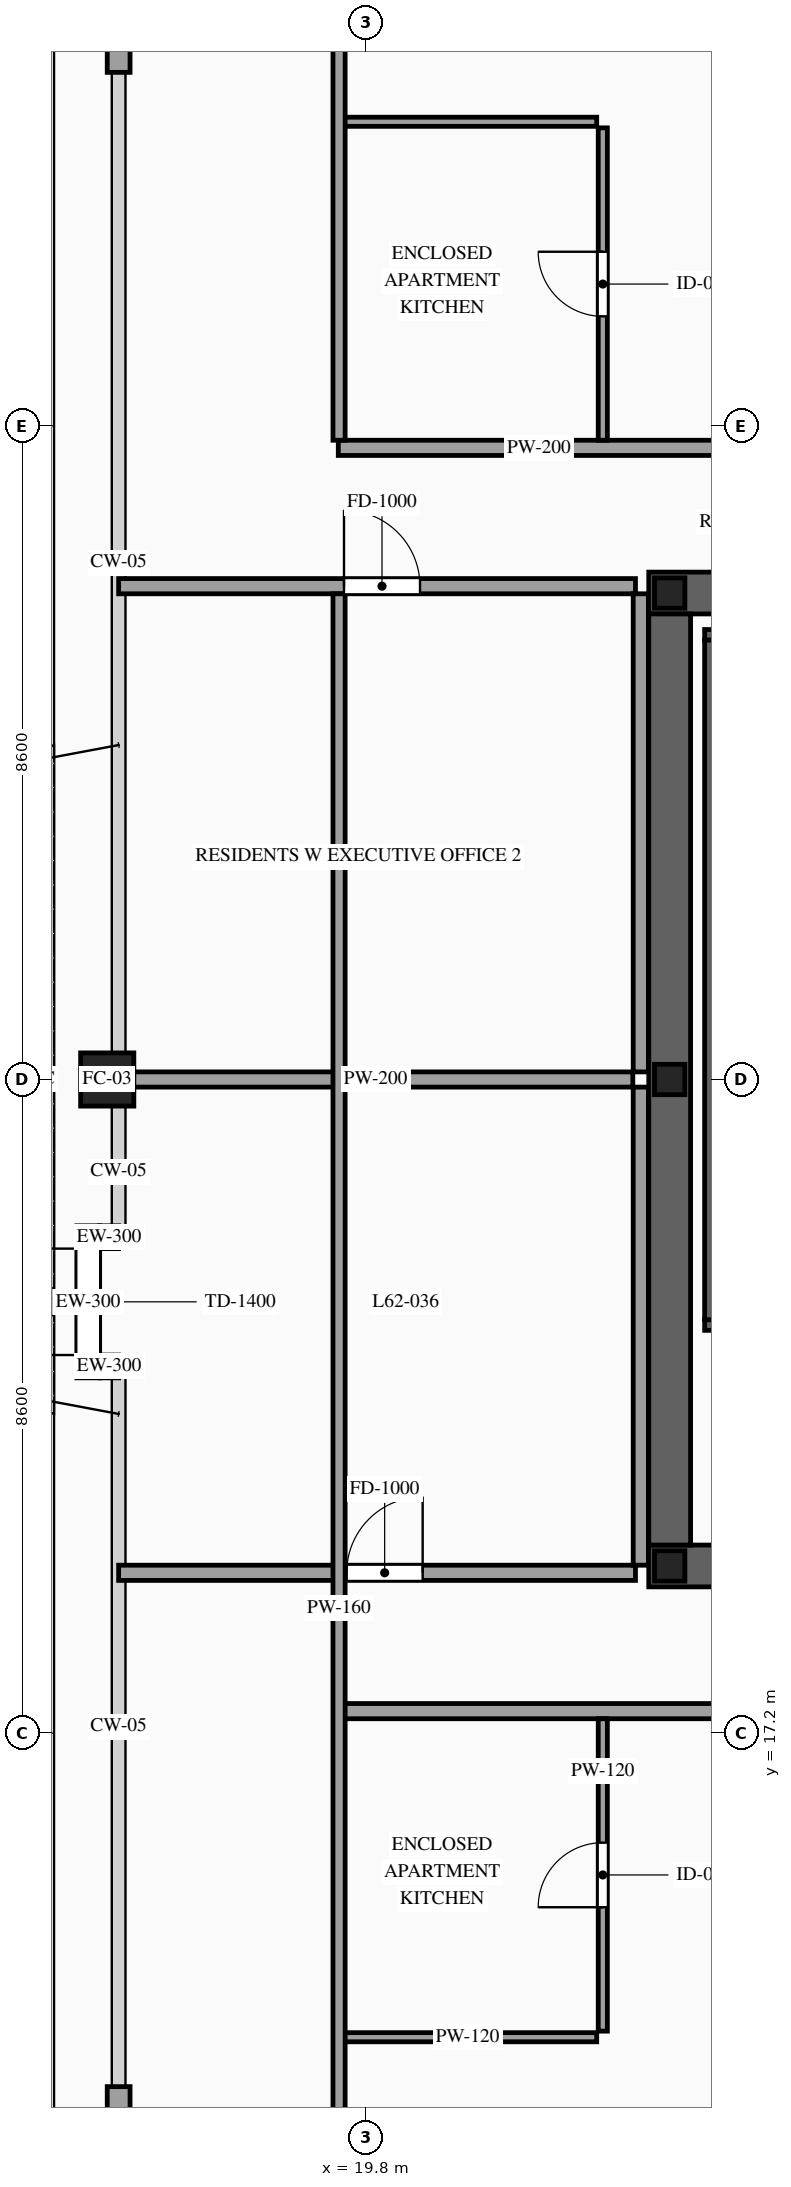
"""IFC4 building model, lengths in metres.
Left out: names, types, materials, properties, quantities, classifications, styles, units other than length and angle.
Written with IfcOpenShell. Run it as: python <this file> out.ifc"""

import sys

from ifc_helpers import new_model, si_unit, direction, frame, frame_2d, origin, origin_2d, place, context, subcontext, project, spatial, rectangle, hollow_rectangle, i_section, extrude, source, transform, mapped, element, fill, save


model = new_model("IFC4")
c1 = context("Model", 3, precision=1e-05, world=origin(), true_north=direction((0.0, 1.0)))
c2 = subcontext(c1, "Body", "Model", "MODEL_VIEW")
j1 = project(units=[si_unit("LENGTHUNIT", "METRE"), si_unit("PLANEANGLEUNIT", "RADIAN")], contexts=[c1])
p1 = place(None, origin())
s1 = spatial("IfcSite", under=j1, at=p1, CompositionType="ELEMENT")
p2 = place(p1, origin())
s2 = spatial("IfcBuilding", under=s1, at=p2, CompositionType="ELEMENT")
p3 = place(p2, frame((0.0, 0.0, 234.6)))
s3 = spatial("IfcBuildingStorey", under=s2, at=p3, CompositionType="ELEMENT", Elevation=234.6)
p4 = place(p3, frame((23.525, 19.4, 0.0), z_axis=(0.0, 0.0, 1.0), x_axis=(1.0, 0.0, 0.0)))
e1 = element("IfcWall", 1, at=p4, inside=s3, PredefinedType="SHEAR", context=c2, shape_type="SweptSolid", body=[
    extrude(rectangle(XDim=26.95, YDim=0.55, at=frame_2d((13.475, 0.0))), origin(), (0.0, 0.0, 1.0), 3.5),
])
p5 = place(p4, frame((1.925, 0.0, 0.0)))
e2 = element("IfcOpeningElement", 2, at=p5, cuts=e1, PredefinedType="OPENING", context=c2, shape_type="SweptSolid", body=[
    extrude(rectangle(XDim=1.1, YDim=2.2, at=frame_2d((0.55, 1.1))), frame((0.0, 0.29, 0.0), z_axis=(0.0, -1.0, 0.0), x_axis=(1.0, 0.0, 0.0)), (0.0, 0.0, 1.0), 0.58),
])
p6 = place(p4, frame((9.825, 0.0, 0.0)))
e3 = element("IfcOpeningElement", 3, at=p6, cuts=e1, PredefinedType="OPENING", context=c2, shape_type="SweptSolid", body=[
    extrude(rectangle(XDim=1.1, YDim=2.2, at=frame_2d((0.55, 1.1))), frame((0.0, 0.29, 0.0), z_axis=(0.0, -1.0, 0.0), x_axis=(1.0, 0.0, 0.0)), (0.0, 0.0, 1.0), 0.58),
])
p7 = place(p4, frame((23.025, 0.0, 0.0)))
e4 = element("IfcOpeningElement", 4, at=p7, cuts=e1, PredefinedType="OPENING", context=c2, shape_type="SweptSolid", body=[
    extrude(rectangle(XDim=1.1, YDim=2.2, at=frame_2d((0.55, 1.1))), frame((0.0, 0.29, 0.0), z_axis=(0.0, -1.0, 0.0), x_axis=(1.0, 0.0, 0.0)), (0.0, 0.0, 1.0), 0.58),
])
p8 = place(p4, frame((19.645, 0.0, 0.0)))
e5 = element("IfcOpeningElement", 5, at=p8, cuts=e1, PredefinedType="OPENING", context=c2, shape_type="SweptSolid", body=[
    extrude(rectangle(XDim=0.9, YDim=2.15, at=frame_2d((0.45, 1.075))), frame((0.0, 0.29, 0.0), z_axis=(0.0, -1.0, 0.0), x_axis=(1.0, 0.0, 0.0)), (0.0, 0.0, 1.0), 0.58),
])
p9 = place(p4, frame((18.205, 0.0, 0.0)))
e6 = element("IfcOpeningElement", 6, at=p9, cuts=e1, PredefinedType="OPENING", context=c2, shape_type="SweptSolid", body=[
    extrude(rectangle(XDim=0.9, YDim=2.15, at=frame_2d((0.45, 1.075))), frame((0.0, 0.29, 0.0), z_axis=(0.0, -1.0, 0.0), x_axis=(1.0, 0.0, 0.0)), (0.0, 0.0, 1.0), 0.58),
])
p10 = place(p3, frame((23.525, 32.2, 0.0), z_axis=(0.0, 0.0, 1.0), x_axis=(1.0, 0.0, 0.0)))
e7 = element("IfcWall", 7, at=p10, inside=s3, PredefinedType="SHEAR", context=c2, shape_type="SweptSolid", body=[
    extrude(rectangle(XDim=26.95, YDim=0.55, at=frame_2d((13.475, 0.0))), origin(), (0.0, 0.0, 1.0), 3.5),
])
p11 = place(p10, frame((4.545, 0.0, 0.0)))
e8 = element("IfcOpeningElement", 8, at=p11, cuts=e7, PredefinedType="OPENING", context=c2, shape_type="SweptSolid", body=[
    extrude(rectangle(XDim=0.9, YDim=2.15, at=frame_2d((0.45, 1.075))), frame((0.0, 0.29, 0.0), z_axis=(0.0, -1.0, 0.0), x_axis=(1.0, 0.0, 0.0)), (0.0, 0.0, 1.0), 0.58),
])
p12 = place(p10, frame((9.825, 0.0, 0.0)))
e9 = element("IfcOpeningElement", 9, at=p12, cuts=e7, PredefinedType="OPENING", context=c2, shape_type="SweptSolid", body=[
    extrude(rectangle(XDim=1.1, YDim=2.2, at=frame_2d((0.55, 1.1))), frame((0.0, 0.29, 0.0), z_axis=(0.0, -1.0, 0.0), x_axis=(1.0, 0.0, 0.0)), (0.0, 0.0, 1.0), 0.58),
])
p13 = place(p10, frame((15.675, 0.0, 0.0)))
e10 = element("IfcOpeningElement", 10, at=p13, cuts=e7, PredefinedType="OPENING", context=c2, shape_type="SweptSolid", body=[
    extrude(rectangle(XDim=1.1, YDim=2.2, at=frame_2d((0.55, 1.1))), frame((0.0, 0.29, 0.0), z_axis=(0.0, -1.0, 0.0), x_axis=(1.0, 0.0, 0.0)), (0.0, 0.0, 1.0), 0.58),
])
p14 = place(p10, frame((18.205, 0.0, 0.0)))
e11 = element("IfcOpeningElement", 11, at=p14, cuts=e7, PredefinedType="OPENING", context=c2, shape_type="SweptSolid", body=[
    extrude(rectangle(XDim=0.9, YDim=2.15, at=frame_2d((0.45, 1.075))), frame((0.0, 0.29, 0.0), z_axis=(0.0, -1.0, 0.0), x_axis=(1.0, 0.0, 0.0)), (0.0, 0.0, 1.0), 0.58),
])
p15 = place(p10, frame((19.645, 0.0, 0.0)))
e12 = element("IfcOpeningElement", 12, at=p15, cuts=e7, PredefinedType="OPENING", context=c2, shape_type="SweptSolid", body=[
    extrude(rectangle(XDim=0.9, YDim=2.15, at=frame_2d((0.45, 1.075))), frame((0.0, 0.29, 0.0), z_axis=(0.0, -1.0, 0.0), x_axis=(1.0, 0.0, 0.0)), (0.0, 0.0, 1.0), 0.58),
])
m1 = source(origin(), c2, "Body", "SweptSolid", [
    extrude(rectangle(XDim=12.25, YDim=0.55, at=frame_2d((6.125, 0.0))), origin(), (0.0, 0.0, 1.0), 3.5),
])
p16 = place(p3, frame((23.8, 19.675, 0.0), z_axis=(0.0, 0.0, 1.0), x_axis=(0.0, 1.0, 0.0)))
e13 = element("IfcWall", 13, at=p16, inside=s3, PredefinedType="SHEAR", context=c2, shape_type="MappedRepresentation", body=[
    mapped(m1, transform((0.0, 0.0, 0.0), scale=1.0)),
])
m2 = source(origin(), c2, "Body", "SweptSolid", [
    extrude(i_section(OverallWidth=0.4, OverallDepth=0.4, WebThickness=0.013, FlangeThickness=0.021, at=origin_2d()), origin(), (0.0, 0.0, 1.0), 3.5),
])
for number, where, z_axis, x_axis in (
    (14, (23.8, 19.4, 0.0), (0.0, 0.0, 1.0), (1.0, 0.0, 0.0)),
    (15, (23.8, 25.8, 0.0), (0.0, 0.0, 1.0), (1.0, 0.0, 0.0)),
    (16, (23.8, 32.2, 0.0), (0.0, 0.0, 1.0), (1.0, 0.0, 0.0)),
):
    element("IfcColumn", number, at=place(p3, frame(where, z_axis=z_axis, x_axis=x_axis)), inside=s3, PredefinedType="COLUMN", context=c2, shape_type="MappedRepresentation", body=[
        mapped(m2, transform((0.0, 0.0, 0.0), scale=1.0)),
    ])
m3 = source(origin(), c2, "Body", "SweptSolid", [
    extrude(hollow_rectangle(XDim=0.7, YDim=0.7, WallThickness=0.032, at=origin_2d()), origin(), (0.0, 0.0, 1.0), 3.5),
])
p17 = place(p3, frame((16.4, 25.8, 0.0), z_axis=(0.0, 0.0, 1.0), x_axis=(1.0, 0.0, 0.0)))
e17 = element("IfcColumn", 17, at=p17, inside=s3, PredefinedType="COLUMN", context=c2, shape_type="MappedRepresentation", body=[
    mapped(m3, transform((0.0, 0.0, 0.0), scale=1.0)),
])
m4 = source(origin(), c2, "Body", "SweptSolid", [
    extrude(rectangle(XDim=3.15, YDim=0.3, at=frame_2d((1.575, 0.0))), origin(), (0.0, 0.0, 1.0), 2.835),
])
p18 = place(p3, frame((16.55, 9.4, 0.0), z_axis=(0.0, 0.0, 1.0), x_axis=(0.0, 1.0, 0.0)))
e18 = element("IfcWall", 18, at=p18, inside=s3, PredefinedType="SOLIDWALL", context=c2, shape_type="MappedRepresentation", body=[
    mapped(m4, transform((0.0, 0.0, 0.0), scale=1.0)),
])
m5 = source(origin(), c2, "Body", "SweptSolid", [
    extrude(rectangle(XDim=3.15, YDim=0.3, at=frame_2d((1.575, 0.0))), origin(), (0.0, 0.0, 1.0), 2.835),
])
p19 = place(p3, frame((16.55, 39.05, 0.0), z_axis=(0.0, 0.0, 1.0), x_axis=(0.0, 1.0, 0.0)))
e19 = element("IfcWall", 19, at=p19, inside=s3, PredefinedType="SOLIDWALL", context=c2, shape_type="MappedRepresentation", body=[
    mapped(m5, transform((0.0, 0.0, 0.0), scale=1.0)),
])
p20 = place(p3, frame((16.15, 21.875, 0.0), z_axis=(0.0, 0.0, 1.0), x_axis=(0.0, 1.0, 0.0)))
e20 = element("IfcWall", 20, at=p20, inside=s3, PredefinedType="SOLIDWALL", context=c2, shape_type="SweptSolid", body=[
    extrude(rectangle(XDim=2.0, YDim=0.3, at=frame_2d((1.0, 0.0))), origin(), (0.0, 0.0, 1.0), 2.835),
])
p21 = place(p20, frame((0.3, 0.0, 0.0)))
e21 = element("IfcOpeningElement", 21, at=p21, cuts=e20, PredefinedType="OPENING", context=c2, shape_type="SweptSolid", body=[
    extrude(rectangle(XDim=1.4, YDim=2.3, at=frame_2d((0.7, 1.15))), frame((0.0, 0.165, 0.0), z_axis=(0.0, -1.0, 0.0), x_axis=(1.0, 0.0, 0.0)), (0.0, 0.0, 1.0), 0.33),
])
m6 = source(origin(), c2, "Body", "SweptSolid", [
    extrude(rectangle(XDim=0.25, YDim=0.3, at=frame_2d((0.125, 0.0))), origin(), (0.0, 0.0, 1.0), 3.28),
])
for number, where, z_axis, x_axis in (
    (22, (16.55, 22.025, 0.0), (0.0, 0.0, 1.0), (-1.0, 0.0, 0.0)),
    (23, (16.3, 23.725, 0.0), (0.0, 0.0, 1.0), (1.0, 0.0, 0.0)),
):
    element("IfcWall", number, at=place(p3, frame(where, z_axis=z_axis, x_axis=x_axis)), inside=s3, PredefinedType="SOLIDWALL", context=c2, shape_type="MappedRepresentation", body=[
        mapped(m6, transform((0.0, 0.0, 0.0), scale=1.0)),
    ])
p22 = place(p3, frame((24.26, 22.57, 0.0), z_axis=(0.0, 0.0, 1.0), x_axis=(1.0, 0.0, 0.0)))
e24 = element("IfcWall", 24, at=p22, inside=s3, PredefinedType="SOLIDWALL", context=c2, shape_type="SweptSolid", body=[
    extrude(rectangle(XDim=3.28, YDim=0.14, at=frame_2d((1.64, 0.0))), origin(), (0.0, 0.0, 1.0), 3.28),
])
p23 = place(p22, frame((1.09, 0.0, 0.0)))
e25 = element("IfcOpeningElement", 25, at=p23, cuts=e24, PredefinedType="OPENING", context=c2, shape_type="SweptSolid", body=[
    extrude(rectangle(XDim=1.1, YDim=2.2, at=frame_2d((0.55, 1.1))), frame((0.0, 0.085, 0.0), z_axis=(0.0, -1.0, 0.0), x_axis=(1.0, 0.0, 0.0)), (0.0, 0.0, 1.0), 0.17),
])
m7 = source(origin(), c2, "Body", "SweptSolid", [
    extrude(rectangle(XDim=3.28, YDim=0.14, at=frame_2d((1.64, 0.0))), origin(), (0.0, 0.0, 1.0), 3.28),
])
p24 = place(p3, frame((24.26, 31.65, 0.0), z_axis=(0.0, 0.0, 1.0), x_axis=(1.0, 0.0, 0.0)))
e26 = element("IfcWall", 26, at=p24, inside=s3, PredefinedType="SOLIDWALL", context=c2, shape_type="MappedRepresentation", body=[
    mapped(m7, transform((0.0, 0.0, 0.0), scale=1.0)),
])
m8 = source(origin(), c2, "Body", "SweptSolid", [
    extrude(rectangle(XDim=8.94, YDim=0.14, at=frame_2d((4.47, 0.0))), origin(), (0.0, 0.0, 1.0), 3.28),
])
p25 = place(p3, frame((24.33, 22.64, 0.0), z_axis=(0.0, 0.0, 1.0), x_axis=(0.0, 1.0, 0.0)))
e27 = element("IfcWall", 27, at=p25, inside=s3, PredefinedType="SOLIDWALL", context=c2, shape_type="MappedRepresentation", body=[
    mapped(m8, transform((0.0, 0.0, 0.0), scale=1.0)),
])
p26 = place(p3, frame((19.44, 17.49, 0.0), z_axis=(0.0, 0.0, 1.0), x_axis=(1.0, 0.0, 0.0)))
e28 = element("IfcWall", 28, at=p26, inside=s3, PredefinedType="PARTITIONING", context=c2, shape_type="SweptSolid", body=[
    extrude(rectangle(XDim=11.51, YDim=0.2, at=frame_2d((5.755, 0.0))), origin(), (0.0, 0.0, 1.0), 3.28),
])
p27 = place(p26, frame((5.355, 0.0, 0.0)))
e29 = element("IfcOpeningElement", 29, at=p27, cuts=e28, PredefinedType="OPENING", context=c2, shape_type="SweptSolid", body=[
    extrude(rectangle(XDim=1.0, YDim=2.2, at=frame_2d((0.5, 1.1))), frame((0.0, 0.115, 0.0), z_axis=(0.0, -1.0, 0.0), x_axis=(1.0, 0.0, 0.0)), (0.0, 0.0, 1.0), 0.23),
])
m9 = source(origin(), c2, "Body", "SweptSolid", [
    extrude(rectangle(XDim=3.4, YDim=0.12, at=frame_2d((1.7, 0.0))), origin(), (0.0, 0.0, 1.0), 3.28),
])
p28 = place(p3, frame((19.44, 13.2, 0.0), z_axis=(0.0, 0.0, 1.0), x_axis=(1.0, 0.0, 0.0)))
e30 = element("IfcWall", 30, at=p28, inside=s3, PredefinedType="PARTITIONING", context=c2, shape_type="MappedRepresentation", body=[
    mapped(m9, transform((0.0, 0.0, 0.0), scale=1.0)),
])
p29 = place(p3, frame((22.92, 13.28, 0.0), z_axis=(0.0, 0.0, 1.0), x_axis=(0.0, 1.0, 0.0)))
e31 = element("IfcWall", 31, at=p29, inside=s3, PredefinedType="PARTITIONING", context=c2, shape_type="SweptSolid", body=[
    extrude(rectangle(XDim=4.11, YDim=0.12, at=frame_2d((2.055, 0.0))), origin(), (0.0, 0.0, 1.0), 3.28),
])
p30 = place(p29, frame((1.63, 0.0, 0.0)))
e32 = element("IfcOpeningElement", 32, at=p30, cuts=e31, PredefinedType="OPENING", context=c2, shape_type="SweptSolid", body=[
    extrude(rectangle(XDim=0.85, YDim=2.1, at=frame_2d((0.425, 1.05))), frame((0.0, 0.075, 0.0), z_axis=(0.0, -1.0, 0.0), x_axis=(1.0, 0.0, 0.0)), (0.0, 0.0, 1.0), 0.15),
])
p31 = place(p3, frame((19.44, 34.11, 0.0), z_axis=(0.0, 0.0, 1.0), x_axis=(1.0, 0.0, 0.0)))
e33 = element("IfcWall", 33, at=p31, inside=s3, PredefinedType="PARTITIONING", context=c2, shape_type="SweptSolid", body=[
    extrude(rectangle(XDim=11.861, YDim=0.2, at=frame_2d((5.931, 0.0))), origin(), (0.0, 0.0, 1.0), 3.28),
])
p32 = place(p31, frame((5.531, 0.0, 0.0)))
e34 = element("IfcOpeningElement", 34, at=p32, cuts=e33, PredefinedType="OPENING", context=c2, shape_type="SweptSolid", body=[
    extrude(rectangle(XDim=1.0, YDim=2.2, at=frame_2d((0.5, 1.1))), frame((0.0, 0.115, 0.0), z_axis=(0.0, -1.0, 0.0), x_axis=(1.0, 0.0, 0.0)), (0.0, 0.0, 1.0), 0.23),
])
p33 = place(p3, frame((19.44, 38.4, 0.0), z_axis=(0.0, 0.0, 1.0), x_axis=(1.0, 0.0, 0.0)))
e35 = element("IfcWall", 35, at=p33, inside=s3, PredefinedType="PARTITIONING", context=c2, shape_type="MappedRepresentation", body=[
    mapped(m9, transform((0.0, 0.0, 0.0), scale=1.0)),
])
p34 = place(p3, frame((22.92, 34.21, 0.0), z_axis=(0.0, 0.0, 1.0), x_axis=(0.0, 1.0, 0.0)))
e36 = element("IfcWall", 36, at=p34, inside=s3, PredefinedType="PARTITIONING", context=c2, shape_type="SweptSolid", body=[
    extrude(rectangle(XDim=4.11, YDim=0.12, at=frame_2d((2.055, 0.0))), origin(), (0.0, 0.0, 1.0), 3.28),
])
p35 = place(p34, frame((1.63, 0.0, 0.0)))
e37 = element("IfcOpeningElement", 37, at=p35, cuts=e36, PredefinedType="OPENING", context=c2, shape_type="SweptSolid", body=[
    extrude(rectangle(XDim=0.85, YDim=2.1, at=frame_2d((0.425, 1.05))), frame((0.0, 0.075, 0.0), z_axis=(0.0, -1.0, 0.0), x_axis=(1.0, 0.0, 0.0)), (0.0, 0.0, 1.0), 0.15),
])
m10 = source(origin(), c2, "Body", "SweptSolid", [
    extrude(rectangle(XDim=11.89, YDim=0.16, at=frame_2d((5.945, 0.0))), origin(), (0.0, 0.0, 1.0), 3.28),
])
p36 = place(p3, frame((19.45, 34.21, 0.0), z_axis=(0.0, 0.0, 1.0), x_axis=(0.0, 1.0, 0.0)))
e38 = element("IfcWall", 38, at=p36, inside=s3, PredefinedType="PARTITIONING", context=c2, shape_type="MappedRepresentation", body=[
    mapped(m10, transform((0.0, 0.0, 0.0), scale=1.0)),
])
p37 = place(p3, frame((16.55, 19.31, 0.0), z_axis=(0.0, 0.0, 1.0), x_axis=(1.0, 0.0, 0.0)))
e39 = element("IfcWall", 39, at=p37, inside=s3, PredefinedType="PARTITIONING", context=c2, shape_type="SweptSolid", body=[
    extrude(rectangle(XDim=6.8, YDim=0.2, at=frame_2d((3.4, 0.0))), origin(), (0.0, 0.0, 1.0), 2.825),
])
p38 = place(p37, frame((3.0, 0.0, 0.0)))
e40 = element("IfcOpeningElement", 40, at=p38, cuts=e39, PredefinedType="OPENING", context=c2, shape_type="SweptSolid", body=[
    extrude(rectangle(XDim=1.0, YDim=2.2, at=frame_2d((0.5, 1.1))), frame((0.0, 0.115, 0.0), z_axis=(0.0, -1.0, 0.0), x_axis=(1.0, 0.0, 0.0)), (0.0, 0.0, 1.0), 0.23),
])
m11 = source(origin(), c2, "Body", "SweptSolid", [
    extrude(rectangle(XDim=6.765, YDim=0.2, at=frame_2d((3.382, 0.0))), origin(), (0.0, 0.0, 1.0), 2.787),
])
p39 = place(p3, frame((16.55, 25.8, 0.0), z_axis=(0.0, 0.0, 1.0), x_axis=(1.0, 0.0, 0.0)))
e41 = element("IfcWall", 41, at=p39, inside=s3, PredefinedType="PARTITIONING", context=c2, shape_type="MappedRepresentation", body=[
    mapped(m11, transform((0.0, 0.0, 0.0), scale=1.0)),
])
m12 = source(origin(), c2, "Body", "SweptSolid", [
    extrude(rectangle(XDim=6.29, YDim=0.2, at=frame_2d((3.145, 0.0))), origin(), (0.0, 0.0, 1.0), 3.28),
])
p40 = place(p3, frame((23.42, 19.41, 0.0), z_axis=(0.0, 0.0, 1.0), x_axis=(0.0, 1.0, 0.0)))
e42 = element("IfcWall", 42, at=p40, inside=s3, PredefinedType="PARTITIONING", context=c2, shape_type="MappedRepresentation", body=[
    mapped(m12, transform((0.0, 0.0, 0.0), scale=1.0)),
])
p41 = place(p3, frame((16.55, 32.29, 0.0), z_axis=(0.0, 0.0, 1.0), x_axis=(1.0, 0.0, 0.0)))
e43 = element("IfcWall", 43, at=p41, inside=s3, PredefinedType="PARTITIONING", context=c2, shape_type="SweptSolid", body=[
    extrude(rectangle(XDim=6.8, YDim=0.2, at=frame_2d((3.4, 0.0))), origin(), (0.0, 0.0, 1.0), 2.825),
])
p42 = place(p41, frame((2.965, 0.0, 0.0)))
e44 = element("IfcOpeningElement", 44, at=p42, cuts=e43, PredefinedType="OPENING", context=c2, shape_type="SweptSolid", body=[
    extrude(rectangle(XDim=1.0, YDim=2.2, at=frame_2d((0.5, 1.1))), frame((0.0, 0.115, 0.0), z_axis=(0.0, -1.0, 0.0), x_axis=(1.0, 0.0, 0.0)), (0.0, 0.0, 1.0), 0.23),
])
m13 = source(origin(), c2, "Body", "SweptSolid", [
    extrude(rectangle(XDim=26.69, YDim=0.16, at=frame_2d((13.345, 0.0))), origin(), (0.0, 0.0, 1.0), 3.28),
])
p43 = place(p3, frame((19.45, 5.5, 0.0), z_axis=(0.0, 0.0, 1.0), x_axis=(0.0, 1.0, 0.0)))
e45 = element("IfcWall", 45, at=p43, inside=s3, PredefinedType="PARTITIONING", context=c2, shape_type="MappedRepresentation", body=[
    mapped(m13, transform((0.0, 0.0, 0.0), scale=1.0)),
])
p44 = place(p3, frame((23.42, 25.9, 0.0), z_axis=(0.0, 0.0, 1.0), x_axis=(0.0, 1.0, 0.0)))
e46 = element("IfcWall", 46, at=p44, inside=s3, PredefinedType="PARTITIONING", context=c2, shape_type="MappedRepresentation", body=[
    mapped(m12, transform((0.0, 0.0, 0.0), scale=1.0)),
])
m14 = source(origin(), c2, "Body", "SweptSolid", [
    extrude(rectangle(XDim=1.4, YDim=2.3, at=frame_2d((0.7, 1.15))), frame((0.0, 0.025, 0.0), z_axis=(0.0, -1.0, 0.0), x_axis=(1.0, 0.0, 0.0)), (0.0, 0.0, 1.0), 0.05),
])
p45 = place(p21, origin())
e47 = element("IfcDoor", 47, at=p45, inside=s3, OperationType="DOUBLE_DOOR_SINGLE_SWING", PredefinedType="DOOR", context=c2, shape_type="MappedRepresentation", body=[
    mapped(m14, transform((0.0, 0.0, 0.0), scale=1.0)),
])
fill(e21, e47)
m15 = source(origin(), c2, "Body", "SweptSolid", [
    extrude(rectangle(XDim=0.85, YDim=2.1, at=frame_2d((0.425, 1.05))), frame((0.0, 0.025, 0.0), z_axis=(0.0, -1.0, 0.0), x_axis=(1.0, 0.0, 0.0)), (0.0, 0.0, 1.0), 0.05),
])
p46 = place(p30, origin())
e48 = element("IfcDoor", 48, at=p46, inside=s3, OperationType="SINGLE_SWING_LEFT", PredefinedType="DOOR", context=c2, shape_type="MappedRepresentation", body=[
    mapped(m15, transform((0.0, 0.0, 0.0), scale=1.0)),
])
fill(e32, e48)
p47 = place(p35, origin())
e49 = element("IfcDoor", 49, at=p47, inside=s3, OperationType="SINGLE_SWING_RIGHT", PredefinedType="DOOR", context=c2, shape_type="MappedRepresentation", body=[
    mapped(m15, transform((0.0, 0.0, 0.0), scale=1.0)),
])
fill(e37, e49)
m16 = source(origin(), c2, "Body", "SweptSolid", [
    extrude(rectangle(XDim=1.0, YDim=2.2, at=frame_2d((0.5, 1.1))), frame((0.0, 0.025, 0.0), z_axis=(0.0, -1.0, 0.0), x_axis=(1.0, 0.0, 0.0)), (0.0, 0.0, 1.0), 0.05),
])
p48 = place(p38, origin())
e50 = element("IfcDoor", 50, at=p48, inside=s3, OperationType="SINGLE_SWING_RIGHT", PredefinedType="DOOR", context=c2, shape_type="MappedRepresentation", body=[
    mapped(m16, transform((0.0, 0.0, 0.0), scale=1.0)),
])
fill(e40, e50)
p49 = place(p42, origin())
e51 = element("IfcDoor", 51, at=p49, inside=s3, OperationType="SINGLE_SWING_LEFT", PredefinedType="DOOR", context=c2, shape_type="MappedRepresentation", body=[
    mapped(m16, transform((0.0, 0.0, 0.0), scale=1.0)),
])
fill(e44, e51)
save(model, sys.argv[1])
